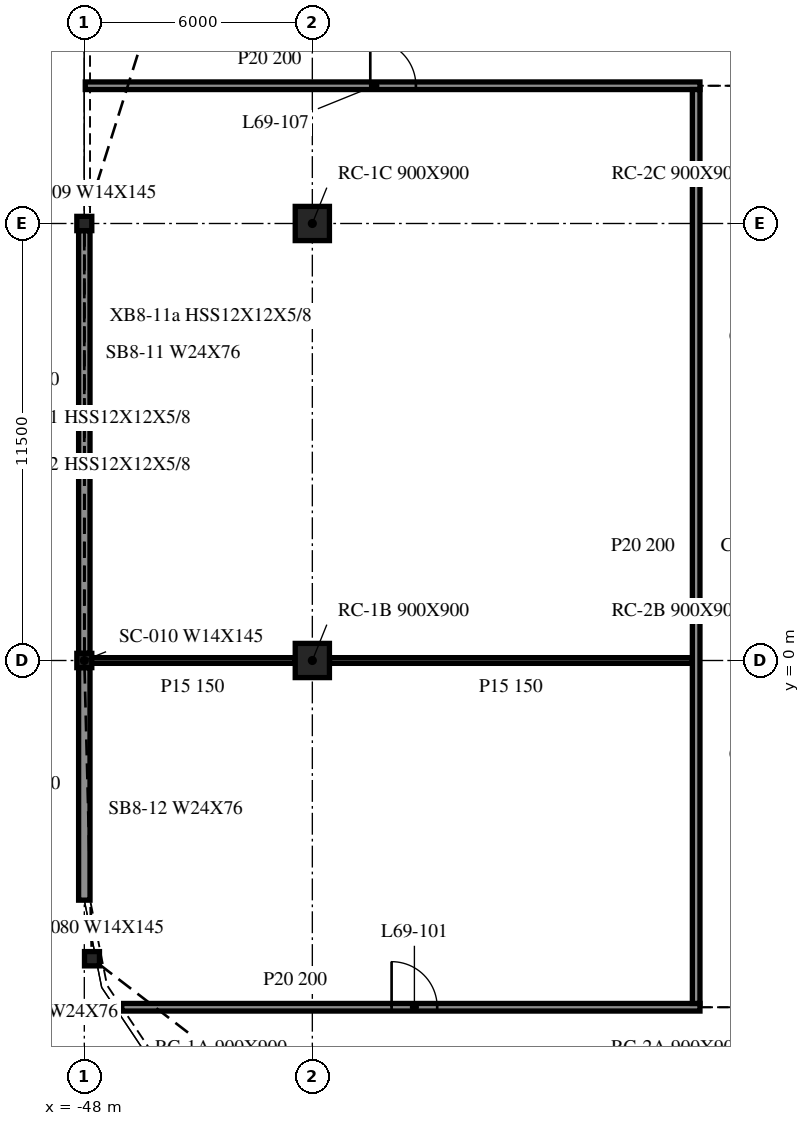
"""IFC4 building model, lengths in metres.
Left out: names, types, materials, properties, quantities, classifications, styles, units other than length and angle.
Written with IfcOpenShell. Run it as: python <this file> out.ifc"""

import sys

from ifc_helpers import new_model, si_unit, direction, frame, frame_2d, origin, origin_2d, place, context, subcontext, project, spatial, rectangle, i_section, extrude, element, fill, save


model = new_model("IFC4")
c1 = context("Model", 3, precision=1e-05, world=origin(), true_north=direction((0.0, 1.0)))
c2 = subcontext(c1, "Body", "Model", "MODEL_VIEW")
j1 = project(units=[si_unit("LENGTHUNIT", "METRE"), si_unit("PLANEANGLEUNIT", "RADIAN")], contexts=[c1])
p1 = place(None, origin())
s1 = spatial("IfcSite", under=j1, at=p1, CompositionType="ELEMENT")
p2 = place(p1, origin())
s2 = spatial("IfcBuilding", under=s1, at=p2, CompositionType="ELEMENT")
p3 = place(p2, frame((0.0, 0.0, 282.3)))
s3 = spatial("IfcBuildingStorey", under=s2, at=p3, CompositionType="ELEMENT", Elevation=282.3)
for number, where, z_axis, x_axis in (
    (1, (-42.0, 0.0, -0.34), (0.0, 0.0, 1.0), (1.0, 0.0, 0.0)),
    (2, (-42.0, 11.5, -0.34), (0.0, 0.0, 1.0), (1.0, 0.0, 0.0)),
):
    element("IfcColumn", number, at=place(p3, frame(where, z_axis=z_axis, x_axis=x_axis)), inside=s3, PredefinedType="COLUMN", context=c2, shape_type="SweptSolid", body=[
        extrude(rectangle(XDim=0.9, YDim=0.9, at=origin_2d()), origin(), (0.0, 0.0, 1.0), 7.34),
    ])
for number, where, z_axis, x_axis in (
    (3, (-48.0, 11.5, -0.34), (0.0, 0.0, 1.0), (1.0, 0.0, 0.0)),
    (4, (-48.0, 0.0, -0.34), (0.0, 0.0, 1.0), (1.0, 0.0, 0.0)),
    (5, (-47.798, -7.848, -0.34), (0.0, 0.0, 1.0), (1.0, 0.0, 0.0)),
):
    element("IfcColumn", number, at=place(p3, frame(where, z_axis=z_axis, x_axis=x_axis)), inside=s3, PredefinedType="COLUMN", context=c2, shape_type="SweptSolid", body=[
        extrude(i_section(OverallWidth=0.394, OverallDepth=0.376, WebThickness=0.017, FlangeThickness=0.028, at=origin_2d()), origin(), (0.0, 0.0, 1.0), 3.8),
    ])
p4 = place(p3, frame((-48.0, 11.312, 0.0), z_axis=(0.0, 0.0, 1.0), x_axis=(0.0, -1.0, 0.0)))
e6 = element("IfcWall", 6, at=p4, inside=s3, PredefinedType="NOTDEFINED", context=c2, shape_type="SweptSolid", body=[
    extrude(rectangle(XDim=11.124, YDim=0.3, at=frame_2d((5.562, 0.0))), origin(), (0.0, 0.0, 1.0), 3.46),
])
p5 = place(p3, frame((-48.0, -0.188, 0.0), z_axis=(0.0, 0.0, 1.0), x_axis=(0.0, -1.0, 0.0)))
e7 = element("IfcWall", 7, at=p5, inside=s3, PredefinedType="NOTDEFINED", context=c2, shape_type="SweptSolid", body=[
    extrude(rectangle(XDim=6.119, YDim=0.3, at=frame_2d((3.06, 0.0))), origin(), (0.0, 0.0, 1.0), 3.46),
])
p6 = place(p3, frame((-47.014, -9.125, 0.0), z_axis=(0.0, 0.0, 1.0), x_axis=(1.0, 0.0, 0.0)))
e8 = element("IfcWall", 8, at=p6, inside=s3, PredefinedType="PARTITIONING", context=c2, shape_type="SweptSolid", body=[
    extrude(rectangle(XDim=15.214, YDim=0.2, at=frame_2d((7.607, 0.0))), origin(), (0.0, 0.0, 1.0), 3.4),
])
p7 = place(p6, frame((7.1, 0.0, 0.0)))
e9 = element("IfcOpeningElement", 9, at=p7, cuts=e8, PredefinedType="OPENING", context=c2, shape_type="SweptSolid", body=[
    extrude(rectangle(XDim=1.2, YDim=2.1, at=frame_2d((0.6, 1.05))), frame((0.0, 0.11, 0.0), z_axis=(0.0, -1.0, 0.0), x_axis=(1.0, 0.0, 0.0)), (0.0, 0.0, 1.0), 0.22),
])
p8 = place(p3, frame((-47.85, 0.0, 0.0), z_axis=(0.0, 0.0, 1.0), x_axis=(1.0, 0.0, 0.0)))
e10 = element("IfcWall", 10, at=p8, inside=s3, PredefinedType="PARTITIONING", context=c2, shape_type="SweptSolid", body=[
    extrude(rectangle(XDim=5.4, YDim=0.15, at=frame_2d((2.7, 0.0))), origin(), (0.0, 0.0, 1.0), 3.4),
])
p9 = place(p3, frame((-41.55, 0.0, 0.0), z_axis=(0.0, 0.0, 1.0), x_axis=(1.0, 0.0, 0.0)))
e11 = element("IfcWall", 11, at=p9, inside=s3, PredefinedType="PARTITIONING", context=c2, shape_type="SweptSolid", body=[
    extrude(rectangle(XDim=9.55, YDim=0.15, at=frame_2d((4.775, 0.0))), origin(), (0.0, 0.0, 1.0), 3.4),
])
p10 = place(p3, frame((-47.975, 15.125, 0.0), z_axis=(0.0, 0.0, 1.0), x_axis=(1.0, 0.0, 0.0)))
e12 = element("IfcWall", 12, at=p10, inside=s3, PredefinedType="PARTITIONING", context=c2, shape_type="SweptSolid", body=[
    extrude(rectangle(XDim=16.175, YDim=0.2, at=frame_2d((8.087, 0.0))), origin(), (0.0, 0.0, 1.0), 3.4),
])
p11 = place(p10, frame((7.5, 0.0, 0.0)))
e13 = element("IfcOpeningElement", 13, at=p11, cuts=e12, PredefinedType="OPENING", context=c2, shape_type="SweptSolid", body=[
    extrude(rectangle(XDim=1.2, YDim=2.1, at=frame_2d((0.6, 1.05))), frame((0.0, 0.11, 0.0), z_axis=(0.0, -1.0, 0.0), x_axis=(1.0, 0.0, 0.0)), (0.0, 0.0, 1.0), 0.22),
])
p12 = place(p3, frame((-31.9, -9.025, 0.0), z_axis=(0.0, 0.0, 1.0), x_axis=(0.0, 1.0, 0.0)))
e14 = element("IfcWall", 14, at=p12, inside=s3, PredefinedType="PARTITIONING", context=c2, shape_type="SweptSolid", body=[
    extrude(rectangle(XDim=24.05, YDim=0.2, at=frame_2d((12.025, 0.0))), origin(), (0.0, 0.0, 1.0), 3.4),
])
p13 = place(p7, origin())
e15 = element("IfcDoor", 15, at=p13, inside=s3, OperationType="SINGLE_SWING_RIGHT", PredefinedType="DOOR", context=c2, shape_type="SweptSolid", body=[
    extrude(rectangle(XDim=1.2, YDim=2.1, at=frame_2d((0.6, 1.05))), frame((0.0, 0.025, 0.0), z_axis=(0.0, -1.0, 0.0), x_axis=(1.0, 0.0, 0.0)), (0.0, 0.0, 1.0), 0.05),
])
fill(e9, e15)
p14 = place(p11, origin())
e16 = element("IfcDoor", 16, at=p14, inside=s3, OperationType="SINGLE_SWING_LEFT", PredefinedType="DOOR", context=c2, shape_type="SweptSolid", body=[
    extrude(rectangle(XDim=1.2, YDim=2.1, at=frame_2d((0.6, 1.05))), frame((0.0, 0.025, 0.0), z_axis=(0.0, -1.0, 0.0), x_axis=(1.0, 0.0, 0.0)), (0.0, 0.0, 1.0), 0.05),
])
fill(e13, e16)
save(model, sys.argv[1])
